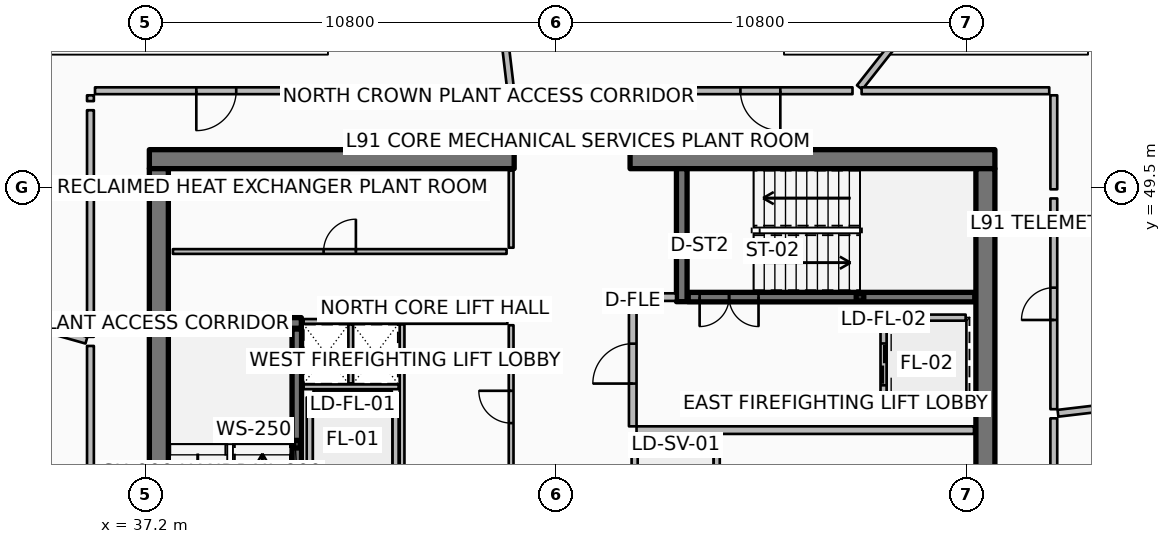
"""IFC4 building model, lengths in metres.
Left out: names, types, materials, properties, quantities, classifications, styles, units other than length and angle.
Written with IfcOpenShell. Run it as: python <this file> out.ifc"""

import sys

from ifc_helpers import new_model, si_unit, direction, frame, frame_2d, origin, origin_2d, place, context, subcontext, project, spatial, rectangle, hollow_rectangle, extrude, element, fill, save


model = new_model("IFC4")
c1 = context("Model", 3, precision=1e-05, world=origin(), true_north=direction((0.0, 1.0)))
c2 = subcontext(c1, "Body", "Model", "MODEL_VIEW")
j1 = project(units=[si_unit("LENGTHUNIT", "METRE"), si_unit("PLANEANGLEUNIT", "RADIAN")], contexts=[c1])
p1 = place(None, origin())
s1 = spatial("IfcSite", under=j1, at=p1, CompositionType="ELEMENT")
p2 = place(p1, origin())
s2 = spatial("IfcBuilding", under=s1, at=p2, CompositionType="ELEMENT")
p3 = place(p2, frame((0.0, 0.0, 363.2)))
s3 = spatial("IfcBuildingStorey", under=s2, at=p3, CompositionType="ELEMENT", Elevation=363.2)
p4 = place(p3, frame((37.3, 50.25, 0.0), z_axis=(0.0, 0.0, 1.0), x_axis=(1.0, 0.0, 0.0)))
e1 = element("IfcWall", 1, at=p4, inside=s3, PredefinedType="SHEAR", context=c2, shape_type="SweptSolid", body=[
    extrude(rectangle(XDim=9.6, YDim=0.5, at=frame_2d((4.8, 0.0))), origin(), (0.0, 0.0, 1.0), 3.6),
])
p5 = place(p3, frame((49.95, 50.25, 0.0), z_axis=(0.0, 0.0, 1.0), x_axis=(1.0, 0.0, 0.0)))
e2 = element("IfcWall", 2, at=p5, inside=s3, PredefinedType="SHEAR", context=c2, shape_type="SweptSolid", body=[
    extrude(rectangle(XDim=9.6, YDim=0.5, at=frame_2d((4.8, 0.0))), origin(), (0.0, 0.0, 1.0), 3.6),
])
for number, where, z_axis, x_axis in (
    (3, (37.55, 34.0, 0.0), (0.0, 0.0, 1.0), (0.0, 1.0, 0.0)),
    (4, (59.3, 34.0, 0.0), (0.0, 0.0, 1.0), (0.0, 1.0, 0.0)),
):
    element("IfcWall", number, at=place(p3, frame(where, z_axis=z_axis, x_axis=x_axis)), inside=s3, PredefinedType="SHEAR", context=c2, shape_type="SweptSolid", body=[
        extrude(rectangle(XDim=16.0, YDim=0.5, at=frame_2d((8.0, 0.0))), origin(), (0.0, 0.0, 1.0), 3.6),
    ])
for number, where, z_axis, x_axis in (
    (5, (37.8, 45.94, 0.0), (0.0, 0.0, 1.0), (1.0, 0.0, 0.0)),
    (6, (51.31, 46.5, 0.0), (0.0, 0.0, 1.0), (0.0, 1.0, 0.0)),
):
    element("IfcWall", number, at=place(p3, frame(where, z_axis=z_axis, x_axis=x_axis)), inside=s3, PredefinedType="SHEAR", context=c2, shape_type="SweptSolid", body=[
        extrude(rectangle(XDim=3.5, YDim=0.28, at=frame_2d((1.75, 0.0))), origin(), (0.0, 0.0, 1.0), 3.6),
    ])
for number, where, z_axis, x_axis in (
    (7, (41.18, 42.75, 0.0), (0.0, 0.0, 1.0), (1.0, 0.0, 0.0)),
    (8, (56.0, 46.62, 0.0), (0.0, 0.0, 1.0), (1.0, 0.0, 0.0)),
):
    element("IfcColumn", number, at=place(p3, frame(where, z_axis=z_axis, x_axis=x_axis)), inside=s3, PredefinedType="COLUMN", context=c2, shape_type="SweptSolid", body=[
        extrude(hollow_rectangle(XDim=0.2, YDim=0.2, WallThickness=0.01, InnerFilletRadius=0.01, OuterFilletRadius=0.02, at=origin_2d()), origin(), (0.0, 0.0, 1.0), 1.595),
    ])
p6 = place(p3, frame((41.18, 38.22, 0.0), z_axis=(0.0, 0.0, 1.0), x_axis=(0.0, 1.0, 0.0)))
e9 = element("IfcWall", 9, at=p6, inside=s3, PredefinedType="SOLIDWALL", context=c2, shape_type="SweptSolid", body=[
    extrude(rectangle(XDim=7.56, YDim=0.25, at=frame_2d((3.78, 0.0))), origin(), (0.0, 0.0, 1.0), 3.32),
])
p7 = place(p6, frame((0.3, 0.0, 0.0)))
e10 = element("IfcOpeningElement", 10, at=p7, cuts=e9, PredefinedType="OPENING", context=c2, shape_type="SweptSolid", body=[
    extrude(rectangle(XDim=1.55, YDim=2.15, at=frame_2d((0.775, 1.075))), frame((0.0, 0.135, 0.0), z_axis=(0.0, -1.0, 0.0), x_axis=(1.0, 0.0, 0.0)), (0.0, 0.0, 1.0), 0.27),
])
p8 = place(p3, frame((51.48, 46.62, 0.0), z_axis=(0.0, 0.0, 1.0), x_axis=(1.0, 0.0, 0.0)))
e11 = element("IfcWall", 11, at=p8, inside=s3, PredefinedType="SOLIDWALL", context=c2, shape_type="SweptSolid", body=[
    extrude(rectangle(XDim=7.54, YDim=0.25, at=frame_2d((3.77, 0.0))), origin(), (0.0, 0.0, 1.0), 3.32),
])
p9 = place(p8, frame((0.3, 0.0, 0.0)))
e12 = element("IfcOpeningElement", 12, at=p9, cuts=e11, PredefinedType="OPENING", context=c2, shape_type="SweptSolid", body=[
    extrude(rectangle(XDim=1.55, YDim=2.15, at=frame_2d((0.775, 1.075))), frame((0.0, 0.135, 0.0), z_axis=(0.0, -1.0, 0.0), x_axis=(1.0, 0.0, 0.0)), (0.0, 0.0, 1.0), 0.27),
])
for number, where, z_axis, x_axis in (
    (13, (43.78, 41.72, 0.0), (0.0, 0.0, 1.0), (0.0, 1.0, 0.0)),
    (14, (41.52, 41.72, 0.0), (0.0, 0.0, 1.0), (0.0, 1.0, 0.0)),
):
    element("IfcWall", number, at=place(p3, frame(where, z_axis=z_axis, x_axis=x_axis)), inside=s3, PredefinedType="PARTITIONING", context=c2, shape_type="SweptSolid", body=[
        extrude(rectangle(XDim=2.26, YDim=0.16, at=frame_2d((1.13, 0.0))), origin(), (0.0, 0.0, 1.0), 3.32),
    ])
p10 = place(p3, frame((41.62, 44.08, 0.0), z_axis=(0.0, 0.0, 1.0), x_axis=(1.0, 0.0, 0.0)))
e15 = element("IfcWall", 15, at=p10, inside=s3, PredefinedType="PARTITIONING", context=c2, shape_type="SweptSolid", body=[
    extrude(rectangle(XDim=2.06, YDim=0.16, at=frame_2d((1.03, 0.0))), origin(), (0.0, 0.0, 1.0), 3.32),
])
p11 = place(p3, frame((56.62, 46.08, 0.0), z_axis=(0.0, 0.0, 1.0), x_axis=(0.0, -1.0, 0.0)))
e16 = element("IfcWall", 16, at=p11, inside=s3, PredefinedType="PARTITIONING", context=c2, shape_type="SweptSolid", body=[
    extrude(rectangle(XDim=2.46, YDim=0.16, at=frame_2d((1.23, 0.0))), origin(), (0.0, 0.0, 1.0), 3.32),
])
p12 = place(p11, frame((0.68, 0.0, 0.0)))
e17 = element("IfcOpeningElement", 17, at=p12, cuts=e16, PredefinedType="OPENING", context=c2, shape_type="SweptSolid", body=[
    extrude(rectangle(XDim=1.1, YDim=2.1, at=frame_2d((0.55, 1.05))), frame((0.0, 0.09, 0.0), z_axis=(0.0, -1.0, 0.0), x_axis=(1.0, 0.0, 0.0)), (0.0, 0.0, 1.0), 0.18),
])
for number, where, z_axis, x_axis in (
    (18, (56.72, 46.08, 0.0), (0.0, 0.0, 1.0), (1.0, 0.0, 0.0)),
    (19, (56.72, 43.62, 0.0), (0.0, 0.0, 1.0), (1.0, 0.0, 0.0)),
):
    element("IfcWall", number, at=place(p3, frame(where, z_axis=z_axis, x_axis=x_axis)), inside=s3, PredefinedType="PARTITIONING", context=c2, shape_type="SweptSolid", body=[
        extrude(rectangle(XDim=2.06, YDim=0.16, at=frame_2d((1.03, 0.0))), origin(), (0.0, 0.0, 1.0), 3.32),
    ])
for number, where, z_axis, x_axis in (
    (20, (52.23, 40.67, 0.0), (0.0, 0.0, 1.0), (0.0, 1.0, 0.0)),
    (21, (50.07, 40.67, 0.0), (0.0, 0.0, 1.0), (0.0, 1.0, 0.0)),
):
    element("IfcWall", number, at=place(p3, frame(where, z_axis=z_axis, x_axis=x_axis)), inside=s3, PredefinedType="PARTITIONING", context=c2, shape_type="SweptSolid", body=[
        extrude(rectangle(XDim=2.16, YDim=0.16, at=frame_2d((1.08, 0.0))), origin(), (0.0, 0.0, 1.0), 3.32),
    ])
p13 = place(p3, frame((50.17, 42.93, 0.0), z_axis=(0.0, 0.0, 1.0), x_axis=(1.0, 0.0, 0.0)))
e22 = element("IfcWall", 22, at=p13, inside=s3, PredefinedType="PARTITIONING", context=c2, shape_type="SweptSolid", body=[
    extrude(rectangle(XDim=1.96, YDim=0.16, at=frame_2d((0.98, 0.0))), origin(), (0.0, 0.0, 1.0), 3.32),
])
p14 = place(p3, frame((46.82, 47.92, 0.0), z_axis=(0.0, 0.0, 1.0), x_axis=(0.0, 1.0, 0.0)))
e23 = element("IfcWall", 23, at=p14, inside=s3, PredefinedType="PARTITIONING", context=c2, shape_type="SweptSolid", body=[
    extrude(rectangle(XDim=2.03, YDim=0.125, at=frame_2d((1.015, 0.0))), origin(), (0.0, 0.0, 1.0), 2.76),
])
p15 = place(p3, frame((37.92, 47.82, 0.0), z_axis=(0.0, 0.0, 1.0), x_axis=(1.0, 0.0, 0.0)))
e24 = element("IfcWall", 24, at=p15, inside=s3, PredefinedType="PARTITIONING", context=c2, shape_type="SweptSolid", body=[
    extrude(rectangle(XDim=8.78, YDim=0.125, at=frame_2d((4.39, 0.0))), origin(), (0.0, 0.0, 1.0), 2.76),
])
p16 = place(p15, frame((3.965, 0.0, 0.0)))
e25 = element("IfcOpeningElement", 25, at=p16, cuts=e24, PredefinedType="OPENING", context=c2, shape_type="SweptSolid", body=[
    extrude(rectangle(XDim=0.85, YDim=2.06, at=frame_2d((0.425, 1.03))), frame((0.0, 0.073, 0.0), z_axis=(0.0, -1.0, 0.0), x_axis=(1.0, 0.0, 0.0)), (0.0, 0.0, 1.0), 0.145),
])
p17 = place(p3, frame((50.12, 43.12, 0.0), z_axis=(0.0, 0.0, 1.0), x_axis=(1.0, 0.0, 0.0)))
e26 = element("IfcWall", 26, at=p17, inside=s3, PredefinedType="PARTITIONING", context=c2, shape_type="SweptSolid", body=[
    extrude(rectangle(XDim=8.88, YDim=0.2, at=frame_2d((4.44, 0.0))), origin(), (0.0, 0.0, 1.0), 3.32),
])
p18 = place(p3, frame((50.14, 46.62, 0.0), z_axis=(0.0, 0.0, 1.0), x_axis=(1.0, 0.0, 0.0)))
e27 = element("IfcWall", 27, at=p18, inside=s3, PredefinedType="PARTITIONING", context=c2, shape_type="SweptSolid", body=[
    extrude(rectangle(XDim=1.02, YDim=0.2, at=frame_2d((0.51, 0.0))), origin(), (0.0, 0.0, 1.0), 3.32),
])
p19 = place(p3, frame((50.02, 43.22, 0.0), z_axis=(0.0, 0.0, 1.0), x_axis=(0.0, 1.0, 0.0)))
e28 = element("IfcWall", 28, at=p19, inside=s3, PredefinedType="PARTITIONING", context=c2, shape_type="SweptSolid", body=[
    extrude(rectangle(XDim=3.3, YDim=0.2, at=frame_2d((1.65, 0.0))), origin(), (0.0, 0.0, 1.0), 3.32),
])
p20 = place(p19, frame((1.125, 0.0, 0.0)))
e29 = element("IfcOpeningElement", 29, at=p20, cuts=e28, PredefinedType="OPENING", context=c2, shape_type="SweptSolid", body=[
    extrude(rectangle(XDim=1.05, YDim=2.1, at=frame_2d((0.525, 1.05))), frame((0.0, 0.11, 0.0), z_axis=(0.0, -1.0, 0.0), x_axis=(1.0, 0.0, 0.0)), (0.0, 0.0, 1.0), 0.22),
])
p21 = place(p3, frame((41.36, 45.98, 0.0), z_axis=(0.0, 0.0, 1.0), x_axis=(1.0, 0.0, 0.0)))
e30 = element("IfcWall", 30, at=p21, inside=s3, PredefinedType="PARTITIONING", context=c2, shape_type="SweptSolid", body=[
    extrude(rectangle(XDim=5.36, YDim=0.125, at=frame_2d((2.68, 0.0))), origin(), (0.0, 0.0, 1.0), 2.76),
])
p22 = place(p3, frame((41.36, 44.26, 0.0), z_axis=(0.0, 0.0, 1.0), x_axis=(1.0, 0.0, 0.0)))
e31 = element("IfcWall", 31, at=p22, inside=s3, PredefinedType="PARTITIONING", context=c2, shape_type="SweptSolid", body=[
    extrude(rectangle(XDim=2.5, YDim=0.125, at=frame_2d((1.25, 0.0))), origin(), (0.0, 0.0, 1.0), 2.76),
])
p23 = place(p3, frame((42.6, 44.35, 0.0), z_axis=(0.0, 0.0, 1.0), x_axis=(0.0, 1.0, 0.0)))
e32 = element("IfcWall", 32, at=p23, inside=s3, PredefinedType="PARTITIONING", context=c2, shape_type="SweptSolid", body=[
    extrude(rectangle(XDim=1.55, YDim=0.125, at=frame_2d((0.775, 0.0))), origin(), (0.0, 0.0, 1.0), 2.76),
])
p24 = place(p3, frame((43.95, 41.58, 0.0), z_axis=(0.0, 0.0, 1.0), x_axis=(0.0, 1.0, 0.0)))
e33 = element("IfcWall", 33, at=p24, inside=s3, PredefinedType="PARTITIONING", context=c2, shape_type="SweptSolid", body=[
    extrude(rectangle(XDim=4.32, YDim=0.125, at=frame_2d((2.16, 0.0))), origin(), (0.0, 0.0, 1.0), 2.76),
])
p25 = place(p3, frame((46.82, 41.58, 0.0), z_axis=(0.0, 0.0, 1.0), x_axis=(0.0, 1.0, 0.0)))
e34 = element("IfcWall", 34, at=p25, inside=s3, PredefinedType="PARTITIONING", context=c2, shape_type="SweptSolid", body=[
    extrude(rectangle(XDim=4.3, YDim=0.125, at=frame_2d((2.15, 0.0))), origin(), (0.0, 0.0, 1.0), 2.76),
])
p26 = place(p25, frame((1.725, 0.0, 0.0)))
e35 = element("IfcOpeningElement", 35, at=p26, cuts=e34, PredefinedType="OPENING", context=c2, shape_type="SweptSolid", body=[
    extrude(rectangle(XDim=0.85, YDim=2.06, at=frame_2d((0.425, 1.03))), frame((0.0, 0.073, 0.0), z_axis=(0.0, -1.0, 0.0), x_axis=(1.0, 0.0, 0.0)), (0.0, 0.0, 1.0), 0.145),
])
p27 = place(p3, frame((66.467, 52.43, 0.0), z_axis=(0.0, 0.0, 1.0), x_axis=(-0.719364153135, 0.694633151516, 0.0)))
e36 = element("IfcWall", 36, at=p27, inside=s3, PredefinedType="PARTITIONING", context=c2, shape_type="SweptSolid", body=[
    extrude(rectangle(XDim=8.006, YDim=0.18, at=frame_2d((4.003, 0.0))), origin(), (0.0, 0.0, 1.0), 2.76),
])
p28 = place(p3, frame((55.803, 52.05, 0.0), z_axis=(0.0, 0.0, 1.0), x_axis=(-1.0, 0.0, 0.0)))
e37 = element("IfcWall", 37, at=p28, inside=s3, PredefinedType="PARTITIONING", context=c2, shape_type="SweptSolid", body=[
    extrude(rectangle(XDim=4.848, YDim=0.18, at=frame_2d((2.424, 0.0))), origin(), (0.0, 0.0, 1.0), 2.76),
])
p29 = place(p28, frame((1.899, 0.0, 0.0)))
e38 = element("IfcOpeningElement", 38, at=p29, cuts=e37, PredefinedType="OPENING", context=c2, shape_type="SweptSolid", body=[
    extrude(rectangle(XDim=1.05, YDim=2.1, at=frame_2d((0.525, 1.05))), frame((0.0, 0.1, 0.0), z_axis=(0.0, -1.0, 0.0), x_axis=(1.0, 0.0, 0.0)), (0.0, 0.0, 1.0), 0.2),
])
p30 = place(p3, frame((50.714, 52.05, 0.0), z_axis=(0.0, 0.0, 1.0), x_axis=(-1.0, 0.0, 0.0)))
e39 = element("IfcWall", 39, at=p30, inside=s3, PredefinedType="PARTITIONING", context=c2, shape_type="SweptSolid", body=[
    extrude(rectangle(XDim=3.784, YDim=0.18, at=frame_2d((1.892, 0.0))), origin(), (0.0, 0.0, 1.0), 2.76),
])
p31 = place(p3, frame((55.991, 52.136, 0.0), z_axis=(0.0, 0.0, 1.0), x_axis=(0.619089811342, 0.785320192974, 0.0)))
e40 = element("IfcWall", 40, at=p31, inside=s3, PredefinedType="PARTITIONING", context=c2, shape_type="SweptSolid", body=[
    extrude(rectangle(XDim=7.426, YDim=0.18, at=frame_2d((3.713, 0.0))), origin(), (0.0, 0.0, 1.0), 2.76),
])
p32 = place(p3, frame((46.798, 52.159, 0.0), z_axis=(0.0, 0.0, 1.0), x_axis=(-0.117541495417, 0.993067971921, 0.0)))
e41 = element("IfcWall", 41, at=p32, inside=s3, PredefinedType="PARTITIONING", context=c2, shape_type="SweptSolid", body=[
    extrude(rectangle(XDim=6.736, YDim=0.18, at=frame_2d((3.368, 0.0))), origin(), (0.0, 0.0, 1.0), 2.76),
])
p33 = place(p3, frame((46.69, 52.05, 0.0), z_axis=(0.0, 0.0, 1.0), x_axis=(-1.0, 0.0, 0.0)))
e42 = element("IfcWall", 42, at=p33, inside=s3, PredefinedType="PARTITIONING", context=c2, shape_type="SweptSolid", body=[
    extrude(rectangle(XDim=4.199, YDim=0.18, at=frame_2d((2.099, 0.0))), origin(), (0.0, 0.0, 1.0), 2.76),
])
p34 = place(p3, frame((42.252, 52.05, 0.0), z_axis=(0.0, 0.0, 1.0), x_axis=(-1.0, 0.0, 0.0)))
e43 = element("IfcWall", 43, at=p34, inside=s3, PredefinedType="PARTITIONING", context=c2, shape_type="SweptSolid", body=[
    extrude(rectangle(XDim=6.382, YDim=0.18, at=frame_2d((3.191, 0.0))), origin(), (0.0, 0.0, 1.0), 2.76),
])
p35 = place(p34, frame((2.666, 0.0, 0.0)))
e44 = element("IfcOpeningElement", 44, at=p35, cuts=e43, PredefinedType="OPENING", context=c2, shape_type="SweptSolid", body=[
    extrude(rectangle(XDim=1.05, YDim=2.1, at=frame_2d((0.525, 1.05))), frame((0.0, 0.1, 0.0), z_axis=(0.0, -1.0, 0.0), x_axis=(1.0, 0.0, 0.0)), (0.0, 0.0, 1.0), 0.2),
])
p36 = place(p3, frame((35.75, 51.93, 0.0), z_axis=(0.0, 0.0, 1.0), x_axis=(0.0, -1.0, 0.0)))
e45 = element("IfcWall", 45, at=p36, inside=s3, PredefinedType="PARTITIONING", context=c2, shape_type="SweptSolid", body=[
    extrude(rectangle(XDim=0.153, YDim=0.18, at=frame_2d((0.076, 0.0))), origin(), (0.0, 0.0, 1.0), 2.76),
])
p37 = place(p3, frame((35.75, 51.537, 0.0), z_axis=(0.0, 0.0, 1.0), x_axis=(0.0, -1.0, 0.0)))
e46 = element("IfcWall", 46, at=p37, inside=s3, PredefinedType="PARTITIONING", context=c2, shape_type="SweptSolid", body=[
    extrude(rectangle(XDim=5.962, YDim=0.18, at=frame_2d((2.981, 0.0))), origin(), (0.0, 0.0, 1.0), 2.76),
])
p38 = place(p3, frame((35.644, 45.485, 0.0), z_axis=(0.0, 0.0, 1.0), x_axis=(-0.96245862205, 0.271428445159, 0.0)))
e47 = element("IfcWall", 47, at=p38, inside=s3, PredefinedType="PARTITIONING", context=c2, shape_type="SweptSolid", body=[
    extrude(rectangle(XDim=7.495, YDim=0.18, at=frame_2d((3.748, 0.0))), origin(), (0.0, 0.0, 1.0), 2.76),
])
p39 = place(p3, frame((35.75, 45.335, 0.0), z_axis=(0.0, 0.0, 1.0), x_axis=(0.0, -1.0, 0.0)))
e48 = element("IfcWall", 48, at=p39, inside=s3, PredefinedType="PARTITIONING", context=c2, shape_type="SweptSolid", body=[
    extrude(rectangle(XDim=4.665, YDim=0.18, at=frame_2d((2.333, 0.0))), origin(), (0.0, 0.0, 1.0), 2.76),
])
p40 = place(p3, frame((61.1, 38.425, 0.0), z_axis=(0.0, 0.0, 1.0), x_axis=(0.0, 1.0, 0.0)))
e49 = element("IfcWall", 49, at=p40, inside=s3, PredefinedType="PARTITIONING", context=c2, shape_type="SweptSolid", body=[
    extrude(rectangle(XDim=5.005, YDim=0.18, at=frame_2d((2.502, 0.0))), origin(), (0.0, 0.0, 1.0), 2.76),
])
p41 = place(p3, frame((61.209, 43.563, 0.0), z_axis=(0.0, 0.0, 1.0), x_axis=(0.993070558818, 0.117519637545, 0.0)))
e50 = element("IfcWall", 50, at=p41, inside=s3, PredefinedType="PARTITIONING", context=c2, shape_type="SweptSolid", body=[
    extrude(rectangle(XDim=7.83, YDim=0.18, at=frame_2d((3.915, 0.0))), origin(), (0.0, 0.0, 1.0), 2.76),
])
p42 = place(p3, frame((61.1, 43.67, 0.0), z_axis=(0.0, 0.0, 1.0), x_axis=(0.0, 1.0, 0.0)))
e51 = element("IfcWall", 51, at=p42, inside=s3, PredefinedType="PARTITIONING", context=c2, shape_type="SweptSolid", body=[
    extrude(rectangle(XDim=5.546, YDim=0.18, at=frame_2d((2.773, 0.0))), origin(), (0.0, 0.0, 1.0), 2.76),
])
p43 = place(p42, frame((2.348, 0.0, 0.0)))
e52 = element("IfcOpeningElement", 52, at=p43, cuts=e51, PredefinedType="OPENING", context=c2, shape_type="SweptSolid", body=[
    extrude(rectangle(XDim=0.85, YDim=2.06, at=frame_2d((0.425, 1.03))), frame((0.0, 0.1, 0.0), z_axis=(0.0, -1.0, 0.0), x_axis=(1.0, 0.0, 0.0)), (0.0, 0.0, 1.0), 0.2),
])
p44 = place(p3, frame((61.1, 49.456, 0.0), z_axis=(0.0, 0.0, 1.0), x_axis=(0.0, 1.0, 0.0)))
e53 = element("IfcWall", 53, at=p44, inside=s3, PredefinedType="PARTITIONING", context=c2, shape_type="SweptSolid", body=[
    extrude(rectangle(XDim=2.474, YDim=0.18, at=frame_2d((1.237, 0.0))), origin(), (0.0, 0.0, 1.0), 2.76),
])
p45 = place(p3, frame((60.98, 52.05, 0.0), z_axis=(0.0, 0.0, 1.0), x_axis=(-1.0, 0.0, 0.0)))
e54 = element("IfcWall", 54, at=p45, inside=s3, PredefinedType="PARTITIONING", context=c2, shape_type="SweptSolid", body=[
    extrude(rectangle(XDim=4.937, YDim=0.18, at=frame_2d((2.469, 0.0))), origin(), (0.0, 0.0, 1.0), 2.76),
])
p46 = place(p9, origin())
e55 = element("IfcDoor", 55, at=p46, inside=s3, OperationType="DOUBLE_DOOR_SINGLE_SWING", PredefinedType="DOOR", context=c2, shape_type="SweptSolid", body=[
    extrude(rectangle(XDim=1.55, YDim=2.15, at=frame_2d((0.775, 1.075))), frame((0.0, 0.025, 0.0), z_axis=(0.0, -1.0, 0.0), x_axis=(1.0, 0.0, 0.0)), (0.0, 0.0, 1.0), 0.05),
])
fill(e12, e55)
p47 = place(p12, origin())
e56 = element("IfcDoor", 56, at=p47, inside=s3, OperationType="DOUBLE_DOOR_SLIDING", PredefinedType="DOOR", context=c2, shape_type="SweptSolid", body=[
    extrude(rectangle(XDim=1.1, YDim=2.1, at=frame_2d((0.55, 1.05))), frame((0.0, 0.025, 0.0), z_axis=(0.0, -1.0, 0.0), x_axis=(1.0, 0.0, 0.0)), (0.0, 0.0, 1.0), 0.05),
])
fill(e17, e56)
p48 = place(p16, origin())
e57 = element("IfcDoor", 57, at=p48, inside=s3, OperationType="SINGLE_SWING_RIGHT", PredefinedType="DOOR", context=c2, shape_type="SweptSolid", body=[
    extrude(rectangle(XDim=0.85, YDim=2.06, at=frame_2d((0.425, 1.03))), frame((0.0, 0.025, 0.0), z_axis=(0.0, -1.0, 0.0), x_axis=(1.0, 0.0, 0.0)), (0.0, 0.0, 1.0), 0.05),
])
fill(e25, e57)
p49 = place(p20, origin())
e58 = element("IfcDoor", 58, at=p49, inside=s3, OperationType="SINGLE_SWING_LEFT", PredefinedType="DOOR", context=c2, shape_type="SweptSolid", body=[
    extrude(rectangle(XDim=1.05, YDim=2.1, at=frame_2d((0.525, 1.05))), frame((0.0, 0.025, 0.0), z_axis=(0.0, -1.0, 0.0), x_axis=(1.0, 0.0, 0.0)), (0.0, 0.0, 1.0), 0.05),
])
fill(e29, e58)
p50 = place(p26, origin())
e59 = element("IfcDoor", 59, at=p50, inside=s3, OperationType="SINGLE_SWING_RIGHT", PredefinedType="DOOR", context=c2, shape_type="SweptSolid", body=[
    extrude(rectangle(XDim=0.85, YDim=2.06, at=frame_2d((0.425, 1.03))), frame((0.0, 0.025, 0.0), z_axis=(0.0, -1.0, 0.0), x_axis=(1.0, 0.0, 0.0)), (0.0, 0.0, 1.0), 0.05),
])
fill(e35, e59)
p51 = place(p29, origin())
e60 = element("IfcDoor", 60, at=p51, inside=s3, OperationType="SINGLE_SWING_LEFT", PredefinedType="DOOR", context=c2, shape_type="SweptSolid", body=[
    extrude(rectangle(XDim=1.05, YDim=2.1, at=frame_2d((0.525, 1.05))), frame((0.0, 0.025, 0.0), z_axis=(0.0, -1.0, 0.0), x_axis=(1.0, 0.0, 0.0)), (0.0, 0.0, 1.0), 0.05),
])
fill(e38, e60)
p52 = place(p35, origin())
e61 = element("IfcDoor", 61, at=p52, inside=s3, OperationType="SINGLE_SWING_RIGHT", PredefinedType="DOOR", context=c2, shape_type="SweptSolid", body=[
    extrude(rectangle(XDim=1.05, YDim=2.1, at=frame_2d((0.525, 1.05))), frame((0.0, 0.025, 0.0), z_axis=(0.0, -1.0, 0.0), x_axis=(1.0, 0.0, 0.0)), (0.0, 0.0, 1.0), 0.05),
])
fill(e44, e61)
p53 = place(p43, origin())
e62 = element("IfcDoor", 62, at=p53, inside=s3, OperationType="SINGLE_SWING_LEFT", PredefinedType="DOOR", context=c2, shape_type="SweptSolid", body=[
    extrude(rectangle(XDim=0.85, YDim=2.06, at=frame_2d((0.425, 1.03))), frame((0.0, 0.025, 0.0), z_axis=(0.0, -1.0, 0.0), x_axis=(1.0, 0.0, 0.0)), (0.0, 0.0, 1.0), 0.05),
])
fill(e52, e62)
save(model, sys.argv[1])
